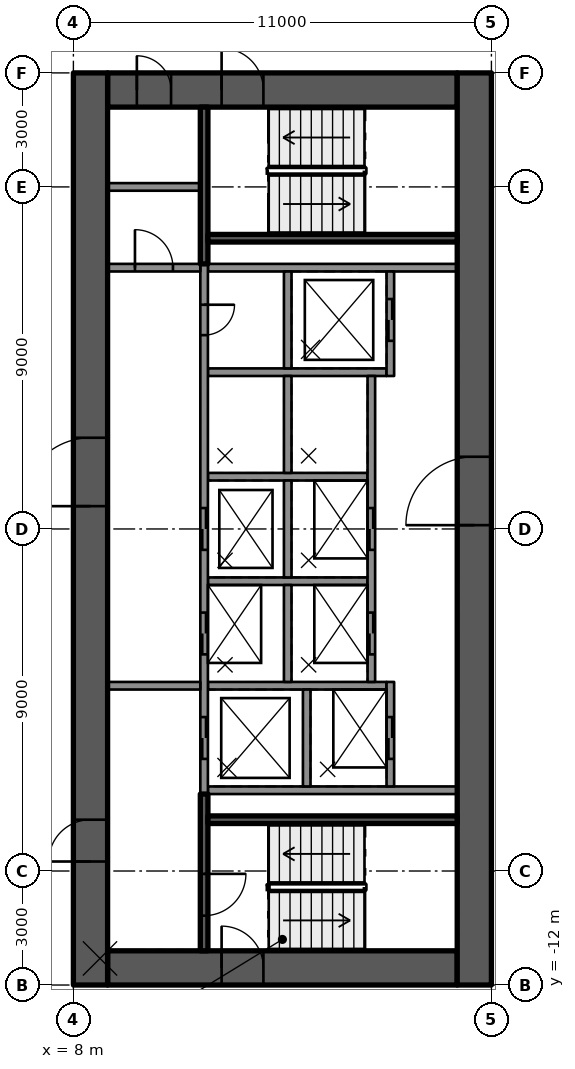
"""IFC4 building model, lengths in metres.
Left out: names, types, materials, properties, quantities, classifications, styles, units other than length and angle.
Written with IfcOpenShell. Run it as: python <this file> out.ifc"""

import sys

from ifc_helpers import new_model, si_unit, direction, frame, frame_2d, origin, place, context, subcontext, project, spatial, rectangle, extrude, element, fill, save


model = new_model("IFC4")
c1 = context("Model", 3, precision=1e-05, world=origin(), true_north=direction((0.0, 1.0)))
c2 = subcontext(c1, "Body", "Model", "MODEL_VIEW")
j1 = project(units=[si_unit("LENGTHUNIT", "METRE"), si_unit("PLANEANGLEUNIT", "RADIAN")], contexts=[c1])
p1 = place(None, origin())
s1 = spatial("IfcSite", under=j1, at=p1, CompositionType="ELEMENT")
p2 = place(p1, origin())
s2 = spatial("IfcBuilding", under=s1, at=p2, CompositionType="ELEMENT")
p3 = place(p2, frame((0.0, 0.0, 84.2)))
s3 = spatial("IfcBuildingStorey", under=s2, at=p3, CompositionType="ELEMENT", Elevation=84.2)
p4 = place(p3, frame((8.9, 11.55, 0.0), z_axis=(0.0, 0.0, 1.0), x_axis=(1.0, 0.0, 0.0)))
e1 = element("IfcWall", 1, at=p4, inside=s3, PredefinedType="SHEAR", context=c2, shape_type="SweptSolid", body=[
    extrude(rectangle(XDim=9.2, YDim=0.9, at=frame_2d((4.6, 0.0))), origin(), (0.0, 0.0, 1.0), 3.5),
])
p5 = place(p4, frame((3.0, 0.0, 0.0)))
e2 = element("IfcOpeningElement", 2, at=p5, cuts=e1, PredefinedType="OPENING", context=c2, shape_type="SweptSolid", body=[
    extrude(rectangle(XDim=1.1, YDim=2.1, at=frame_2d((0.55, 1.05))), frame((0.0, 0.46, 0.0), z_axis=(0.0, -1.0, 0.0), x_axis=(1.0, 0.0, 0.0)), (0.0, 0.0, 1.0), 0.92),
])
p6 = place(p4, frame((0.77, 0.0, 0.0)))
e3 = element("IfcOpeningElement", 3, at=p6, cuts=e1, PredefinedType="OPENING", context=c2, shape_type="SweptSolid", body=[
    extrude(rectangle(XDim=0.9, YDim=2.1, at=frame_2d((0.45, 1.05))), frame((0.0, 0.46, 0.0), z_axis=(0.0, -1.0, 0.0), x_axis=(1.0, 0.0, 0.0)), (0.0, 0.0, 1.0), 0.92),
])
p7 = place(p3, frame((8.9, -11.55, 0.0), z_axis=(0.0, 0.0, 1.0), x_axis=(1.0, 0.0, 0.0)))
e4 = element("IfcWall", 4, at=p7, inside=s3, PredefinedType="SHEAR", context=c2, shape_type="SweptSolid", body=[
    extrude(rectangle(XDim=9.2, YDim=0.9, at=frame_2d((4.6, 0.0))), origin(), (0.0, 0.0, 1.0), 3.5),
])
p8 = place(p7, frame((3.0, 0.0, 0.0)))
e5 = element("IfcOpeningElement", 5, at=p8, cuts=e4, PredefinedType="OPENING", context=c2, shape_type="SweptSolid", body=[
    extrude(rectangle(XDim=1.1, YDim=2.1, at=frame_2d((0.55, 1.05))), frame((0.0, 0.46, 0.0), z_axis=(0.0, -1.0, 0.0), x_axis=(1.0, 0.0, 0.0)), (0.0, 0.0, 1.0), 0.92),
])
p9 = place(p3, frame((8.45, -12.0, 0.0), z_axis=(0.0, 0.0, 1.0), x_axis=(0.0, 1.0, 0.0)))
e6 = element("IfcWall", 6, at=p9, inside=s3, PredefinedType="SHEAR", context=c2, shape_type="SweptSolid", body=[
    extrude(rectangle(XDim=24.0, YDim=0.9, at=frame_2d((12.0, 0.0))), origin(), (0.0, 0.0, 1.0), 3.5),
])
p10 = place(p9, frame((12.6, 0.0, 0.0)))
e7 = element("IfcOpeningElement", 7, at=p10, cuts=e6, PredefinedType="OPENING", context=c2, shape_type="SweptSolid", body=[
    extrude(rectangle(XDim=1.8, YDim=2.1, at=frame_2d((0.9, 1.05))), frame((0.0, 0.46, 0.0), z_axis=(0.0, -1.0, 0.0), x_axis=(1.0, 0.0, 0.0)), (0.0, 0.0, 1.0), 0.92),
])
p11 = place(p9, frame((3.25, 0.0, 0.0)))
e8 = element("IfcOpeningElement", 8, at=p11, cuts=e6, PredefinedType="OPENING", context=c2, shape_type="SweptSolid", body=[
    extrude(rectangle(XDim=1.1, YDim=2.1, at=frame_2d((0.55, 1.05))), frame((0.0, 0.46, 0.0), z_axis=(0.0, -1.0, 0.0), x_axis=(1.0, 0.0, 0.0)), (0.0, 0.0, 1.0), 0.92),
])
p12 = place(p3, frame((18.55, -12.0, 0.0), z_axis=(0.0, 0.0, 1.0), x_axis=(0.0, 1.0, 0.0)))
e9 = element("IfcWall", 9, at=p12, inside=s3, PredefinedType="SHEAR", context=c2, shape_type="SweptSolid", body=[
    extrude(rectangle(XDim=24.0, YDim=0.9, at=frame_2d((12.0, 0.0))), origin(), (0.0, 0.0, 1.0), 3.5),
])
p13 = place(p12, frame((12.1, 0.0, 0.0)))
e10 = element("IfcOpeningElement", 10, at=p13, cuts=e9, PredefinedType="OPENING", context=c2, shape_type="SweptSolid", body=[
    extrude(rectangle(XDim=1.8, YDim=2.1, at=frame_2d((0.9, 1.05))), frame((0.0, 0.46, 0.0), z_axis=(0.0, -1.0, 0.0), x_axis=(1.0, 0.0, 0.0)), (0.0, 0.0, 1.0), 0.92),
])
for number, where, z_axis, x_axis in (
    (11, (11.54, -6.875, 0.0), (0.0, 0.0, 1.0), (1.0, 0.0, 0.0)),
    (12, (11.54, 6.875, 0.0), (0.0, 0.0, 1.0), (1.0, 0.0, 0.0)),
):
    element("IfcWall", number, at=place(p3, frame(where, z_axis=z_axis, x_axis=x_axis)), inside=s3, PredefinedType="SOLIDWALL", context=c2, shape_type="SweptSolid", body=[
        extrude(rectangle(XDim=6.56, YDim=0.2, at=frame_2d((3.28, 0.0))), origin(), (0.0, 0.0, 1.0), 3.09),
    ])
p14 = place(p3, frame((11.54, 4.125, 0.0), z_axis=(0.0, 0.0, 1.0), x_axis=(1.0, 0.0, 0.0)))
e13 = element("IfcWall", 13, at=p14, inside=s3, PredefinedType="SOLIDWALL", context=c2, shape_type="SweptSolid", body=[
    extrude(rectangle(XDim=4.7, YDim=0.2, at=frame_2d((2.35, 0.0))), origin(), (0.0, 0.0, 1.0), 3.09),
])
for number, where, z_axis, x_axis in (
    (14, (11.54, 1.375, 0.0), (0.0, 0.0, 1.0), (1.0, 0.0, 0.0)),
    (15, (11.54, -1.375, 0.0), (0.0, 0.0, 1.0), (1.0, 0.0, 0.0)),
):
    element("IfcWall", number, at=place(p3, frame(where, z_axis=z_axis, x_axis=x_axis)), inside=s3, PredefinedType="SOLIDWALL", context=c2, shape_type="SweptSolid", body=[
        extrude(rectangle(XDim=4.2, YDim=0.2, at=frame_2d((2.1, 0.0))), origin(), (0.0, 0.0, 1.0), 3.09),
    ])
p15 = place(p3, frame((11.54, -4.125, 0.0), z_axis=(0.0, 0.0, 1.0), x_axis=(1.0, 0.0, 0.0)))
e16 = element("IfcWall", 16, at=p15, inside=s3, PredefinedType="SOLIDWALL", context=c2, shape_type="SweptSolid", body=[
    extrude(rectangle(XDim=4.7, YDim=0.2, at=frame_2d((2.35, 0.0))), origin(), (0.0, 0.0, 1.0), 3.09),
])
p16 = place(p3, frame((11.44, 6.975, 0.0), z_axis=(0.0, 0.0, 1.0), x_axis=(0.0, -1.0, 0.0)))
e17 = element("IfcWall", 17, at=p16, inside=s3, PredefinedType="SOLIDWALL", context=c2, shape_type="SweptSolid", body=[
    extrude(rectangle(XDim=13.95, YDim=0.2, at=frame_2d((6.975, 0.0))), origin(), (0.0, 0.0, 1.0), 3.09),
])
p17 = place(p16, frame((6.425, 0.0, 0.0)))
e18 = element("IfcOpeningElement", 18, at=p17, cuts=e17, PredefinedType="OPENING", context=c2, shape_type="SweptSolid", body=[
    extrude(rectangle(XDim=1.1, YDim=2.1, at=frame_2d((0.55, 1.05))), frame((0.0, 0.11, 0.0), z_axis=(0.0, -1.0, 0.0), x_axis=(1.0, 0.0, 0.0)), (0.0, 0.0, 1.0), 0.22),
])
p18 = place(p16, frame((9.175, 0.0, 0.0)))
e19 = element("IfcOpeningElement", 19, at=p18, cuts=e17, PredefinedType="OPENING", context=c2, shape_type="SweptSolid", body=[
    extrude(rectangle(XDim=1.1, YDim=2.1, at=frame_2d((0.55, 1.05))), frame((0.0, 0.11, 0.0), z_axis=(0.0, -1.0, 0.0), x_axis=(1.0, 0.0, 0.0)), (0.0, 0.0, 1.0), 0.22),
])
p19 = place(p16, frame((11.925, 0.0, 0.0)))
e20 = element("IfcOpeningElement", 20, at=p19, cuts=e17, PredefinedType="OPENING", context=c2, shape_type="SweptSolid", body=[
    extrude(rectangle(XDim=1.1, YDim=2.1, at=frame_2d((0.55, 1.05))), frame((0.0, 0.11, 0.0), z_axis=(0.0, -1.0, 0.0), x_axis=(1.0, 0.0, 0.0)), (0.0, 0.0, 1.0), 0.22),
])
p20 = place(p16, frame((1.075, 0.0, 0.0)))
e21 = element("IfcOpeningElement", 21, at=p20, cuts=e17, PredefinedType="OPENING", context=c2, shape_type="SweptSolid", body=[
    extrude(rectangle(XDim=0.8, YDim=2.1, at=frame_2d((0.4, 1.05))), frame((0.0, 0.11, 0.0), z_axis=(0.0, -1.0, 0.0), x_axis=(1.0, 0.0, 0.0)), (0.0, 0.0, 1.0), 0.22),
])
for number, where, z_axis, x_axis in (
    (22, (13.64, 6.775, 0.0), (0.0, 0.0, 1.0), (0.0, -1.0, 0.0)),
    (23, (13.64, 4.025, 0.0), (0.0, 0.0, 1.0), (0.0, -1.0, 0.0)),
    (24, (13.64, 1.275, 0.0), (0.0, 0.0, 1.0), (0.0, -1.0, 0.0)),
    (25, (13.64, -1.475, 0.0), (0.0, 0.0, 1.0), (0.0, -1.0, 0.0)),
    (26, (14.14, -4.225, 0.0), (0.0, 0.0, 1.0), (0.0, -1.0, 0.0)),
):
    element("IfcWall", number, at=place(p3, frame(where, z_axis=z_axis, x_axis=x_axis)), inside=s3, PredefinedType="SOLIDWALL", context=c2, shape_type="SweptSolid", body=[
        extrude(rectangle(XDim=2.55, YDim=0.2, at=frame_2d((1.275, 0.0))), origin(), (0.0, 0.0, 1.0), 3.09),
    ])
p21 = place(p3, frame((16.34, 6.775, 0.0), z_axis=(0.0, 0.0, 1.0), x_axis=(0.0, -1.0, 0.0)))
e27 = element("IfcWall", 27, at=p21, inside=s3, PredefinedType="SOLIDWALL", context=c2, shape_type="SweptSolid", body=[
    extrude(rectangle(XDim=2.75, YDim=0.2, at=frame_2d((1.375, 0.0))), origin(), (0.0, 0.0, 1.0), 3.09),
])
p22 = place(p21, frame((0.725, 0.0, 0.0)))
e28 = element("IfcOpeningElement", 28, at=p22, cuts=e27, PredefinedType="OPENING", context=c2, shape_type="SweptSolid", body=[
    extrude(rectangle(XDim=1.1, YDim=2.1, at=frame_2d((0.55, 1.05))), frame((0.0, 0.11, 0.0), z_axis=(0.0, -1.0, 0.0), x_axis=(1.0, 0.0, 0.0)), (0.0, 0.0, 1.0), 0.22),
])
p23 = place(p3, frame((15.84, 4.025, 0.0), z_axis=(0.0, 0.0, 1.0), x_axis=(0.0, -1.0, 0.0)))
e29 = element("IfcWall", 29, at=p23, inside=s3, PredefinedType="SOLIDWALL", context=c2, shape_type="SweptSolid", body=[
    extrude(rectangle(XDim=8.05, YDim=0.2, at=frame_2d((4.025, 0.0))), origin(), (0.0, 0.0, 1.0), 3.09),
])
p24 = place(p23, frame((3.475, 0.0, 0.0)))
e30 = element("IfcOpeningElement", 30, at=p24, cuts=e29, PredefinedType="OPENING", context=c2, shape_type="SweptSolid", body=[
    extrude(rectangle(XDim=1.1, YDim=2.1, at=frame_2d((0.55, 1.05))), frame((0.0, 0.11, 0.0), z_axis=(0.0, -1.0, 0.0), x_axis=(1.0, 0.0, 0.0)), (0.0, 0.0, 1.0), 0.22),
])
p25 = place(p23, frame((6.225, 0.0, 0.0)))
e31 = element("IfcOpeningElement", 31, at=p25, cuts=e29, PredefinedType="OPENING", context=c2, shape_type="SweptSolid", body=[
    extrude(rectangle(XDim=1.1, YDim=2.1, at=frame_2d((0.55, 1.05))), frame((0.0, 0.11, 0.0), z_axis=(0.0, -1.0, 0.0), x_axis=(1.0, 0.0, 0.0)), (0.0, 0.0, 1.0), 0.22),
])
p26 = place(p3, frame((16.34, -4.025, 0.0), z_axis=(0.0, 0.0, 1.0), x_axis=(0.0, -1.0, 0.0)))
e32 = element("IfcWall", 32, at=p26, inside=s3, PredefinedType="SOLIDWALL", context=c2, shape_type="SweptSolid", body=[
    extrude(rectangle(XDim=2.75, YDim=0.2, at=frame_2d((1.375, 0.0))), origin(), (0.0, 0.0, 1.0), 3.09),
])
p27 = place(p26, frame((0.925, 0.0, 0.0)))
e33 = element("IfcOpeningElement", 33, at=p27, cuts=e32, PredefinedType="OPENING", context=c2, shape_type="SweptSolid", body=[
    extrude(rectangle(XDim=1.1, YDim=2.1, at=frame_2d((0.55, 1.05))), frame((0.0, 0.11, 0.0), z_axis=(0.0, -1.0, 0.0), x_axis=(1.0, 0.0, 0.0)), (0.0, 0.0, 1.0), 0.22),
])
p28 = place(p3, frame((11.44, -6.975, 0.0), z_axis=(0.0, 0.0, 1.0), x_axis=(0.0, -1.0, 0.0)))
e34 = element("IfcWall", 34, at=p28, inside=s3, PredefinedType="SOLIDWALL", context=c2, shape_type="SweptSolid", body=[
    extrude(rectangle(XDim=4.125, YDim=0.2, at=frame_2d((2.062, 0.0))), origin(), (0.0, 0.0, 1.0), 3.09),
])
p29 = place(p28, frame((2.1, 0.0, 0.0)))
e35 = element("IfcOpeningElement", 35, at=p29, cuts=e34, PredefinedType="OPENING", context=c2, shape_type="SweptSolid", body=[
    extrude(rectangle(XDim=1.1, YDim=2.1, at=frame_2d((0.55, 1.05))), frame((0.0, 0.11, 0.0), z_axis=(0.0, -1.0, 0.0), x_axis=(1.0, 0.0, 0.0)), (0.0, 0.0, 1.0), 0.22),
])
p30 = place(p3, frame((11.54, -7.65, 0.0), z_axis=(0.0, 0.0, 1.0), x_axis=(1.0, 0.0, 0.0)))
e36 = element("IfcWall", 36, at=p30, inside=s3, PredefinedType="SOLIDWALL", context=c2, shape_type="SweptSolid", body=[
    extrude(rectangle(XDim=6.56, YDim=0.2, at=frame_2d((3.28, 0.0))), origin(), (0.0, 0.0, 1.0), 3.09),
])
p31 = place(p3, frame((11.44, 11.1, 0.0), z_axis=(0.0, 0.0, 1.0), x_axis=(0.0, -1.0, 0.0)))
e37 = element("IfcWall", 37, at=p31, inside=s3, PredefinedType="SOLIDWALL", context=c2, shape_type="SweptSolid", body=[
    extrude(rectangle(XDim=4.125, YDim=0.2, at=frame_2d((2.062, 0.0))), origin(), (0.0, 0.0, 1.0), 3.09),
])
p32 = place(p3, frame((11.54, 7.65, 0.0), z_axis=(0.0, 0.0, 1.0), x_axis=(1.0, 0.0, 0.0)))
e38 = element("IfcWall", 38, at=p32, inside=s3, PredefinedType="SOLIDWALL", context=c2, shape_type="SweptSolid", body=[
    extrude(rectangle(XDim=6.56, YDim=0.2, at=frame_2d((3.28, 0.0))), origin(), (0.0, 0.0, 1.0), 3.09),
])
p33 = place(p3, frame((8.9, -4.125, 0.0), z_axis=(0.0, 0.0, 1.0), x_axis=(1.0, 0.0, 0.0)))
e39 = element("IfcWall", 39, at=p33, inside=s3, PredefinedType="PARTITIONING", context=c2, shape_type="SweptSolid", body=[
    extrude(rectangle(XDim=2.44, YDim=0.2, at=frame_2d((1.22, 0.0))), origin(), (0.0, 0.0, 1.0), 3.09),
])
p34 = place(p3, frame((8.9, 6.875, 0.0), z_axis=(0.0, 0.0, 1.0), x_axis=(1.0, 0.0, 0.0)))
e40 = element("IfcWall", 40, at=p34, inside=s3, PredefinedType="PARTITIONING", context=c2, shape_type="SweptSolid", body=[
    extrude(rectangle(XDim=2.44, YDim=0.2, at=frame_2d((1.22, 0.0))), origin(), (0.0, 0.0, 1.0), 3.09),
])
p35 = place(p34, frame((0.72, 0.0, 0.0)))
e41 = element("IfcOpeningElement", 41, at=p35, cuts=e40, PredefinedType="OPENING", context=c2, shape_type="SweptSolid", body=[
    extrude(rectangle(XDim=1.0, YDim=2.1, at=frame_2d((0.5, 1.05))), frame((0.0, 0.11, 0.0), z_axis=(0.0, -1.0, 0.0), x_axis=(1.0, 0.0, 0.0)), (0.0, 0.0, 1.0), 0.22),
])
p36 = place(p3, frame((8.9, 9.0, 0.0), z_axis=(0.0, 0.0, 1.0), x_axis=(1.0, 0.0, 0.0)))
e42 = element("IfcWall", 42, at=p36, inside=s3, PredefinedType="PARTITIONING", context=c2, shape_type="SweptSolid", body=[
    extrude(rectangle(XDim=2.44, YDim=0.2, at=frame_2d((1.22, 0.0))), origin(), (0.0, 0.0, 1.0), 3.09),
])
p37 = place(p22, origin())
e43 = element("IfcDoor", 43, at=p37, inside=s3, OperationType="DOUBLE_DOOR_SLIDING", PredefinedType="DOOR", context=c2, shape_type="SweptSolid", body=[
    extrude(rectangle(XDim=1.1, YDim=2.1, at=frame_2d((0.55, 1.05))), frame((0.0, 0.025, 0.0), z_axis=(0.0, -1.0, 0.0), x_axis=(1.0, 0.0, 0.0)), (0.0, 0.0, 1.0), 0.05),
])
fill(e28, e43)
p38 = place(p17, origin())
e44 = element("IfcDoor", 44, at=p38, inside=s3, OperationType="DOUBLE_DOOR_SLIDING", PredefinedType="DOOR", context=c2, shape_type="SweptSolid", body=[
    extrude(rectangle(XDim=1.1, YDim=2.1, at=frame_2d((0.55, 1.05))), frame((0.0, 0.025, 0.0), z_axis=(0.0, -1.0, 0.0), x_axis=(1.0, 0.0, 0.0)), (0.0, 0.0, 1.0), 0.05),
])
fill(e18, e44)
p39 = place(p24, origin())
e45 = element("IfcDoor", 45, at=p39, inside=s3, OperationType="DOUBLE_DOOR_SLIDING", PredefinedType="DOOR", context=c2, shape_type="SweptSolid", body=[
    extrude(rectangle(XDim=1.1, YDim=2.1, at=frame_2d((0.55, 1.05))), frame((0.0, 0.025, 0.0), z_axis=(0.0, -1.0, 0.0), x_axis=(1.0, 0.0, 0.0)), (0.0, 0.0, 1.0), 0.05),
])
fill(e30, e45)
p40 = place(p18, origin())
e46 = element("IfcDoor", 46, at=p40, inside=s3, OperationType="DOUBLE_DOOR_SLIDING", PredefinedType="DOOR", context=c2, shape_type="SweptSolid", body=[
    extrude(rectangle(XDim=1.1, YDim=2.1, at=frame_2d((0.55, 1.05))), frame((0.0, 0.025, 0.0), z_axis=(0.0, -1.0, 0.0), x_axis=(1.0, 0.0, 0.0)), (0.0, 0.0, 1.0), 0.05),
])
fill(e19, e46)
p41 = place(p25, origin())
e47 = element("IfcDoor", 47, at=p41, inside=s3, OperationType="DOUBLE_DOOR_SLIDING", PredefinedType="DOOR", context=c2, shape_type="SweptSolid", body=[
    extrude(rectangle(XDim=1.1, YDim=2.1, at=frame_2d((0.55, 1.05))), frame((0.0, 0.025, 0.0), z_axis=(0.0, -1.0, 0.0), x_axis=(1.0, 0.0, 0.0)), (0.0, 0.0, 1.0), 0.05),
])
fill(e31, e47)
p42 = place(p19, origin())
e48 = element("IfcDoor", 48, at=p42, inside=s3, OperationType="DOUBLE_DOOR_SLIDING", PredefinedType="DOOR", context=c2, shape_type="SweptSolid", body=[
    extrude(rectangle(XDim=1.1, YDim=2.1, at=frame_2d((0.55, 1.05))), frame((0.0, 0.025, 0.0), z_axis=(0.0, -1.0, 0.0), x_axis=(1.0, 0.0, 0.0)), (0.0, 0.0, 1.0), 0.05),
])
fill(e20, e48)
p43 = place(p27, origin())
e49 = element("IfcDoor", 49, at=p43, inside=s3, OperationType="DOUBLE_DOOR_SLIDING", PredefinedType="DOOR", context=c2, shape_type="SweptSolid", body=[
    extrude(rectangle(XDim=1.1, YDim=2.1, at=frame_2d((0.55, 1.05))), frame((0.0, 0.025, 0.0), z_axis=(0.0, -1.0, 0.0), x_axis=(1.0, 0.0, 0.0)), (0.0, 0.0, 1.0), 0.05),
])
fill(e33, e49)
p44 = place(p20, origin())
e50 = element("IfcDoor", 50, at=p44, inside=s3, OperationType="SINGLE_SWING_LEFT", PredefinedType="DOOR", context=c2, shape_type="SweptSolid", body=[
    extrude(rectangle(XDim=0.8, YDim=2.1, at=frame_2d((0.4, 1.05))), frame((0.0, 0.025, 0.0), z_axis=(0.0, -1.0, 0.0), x_axis=(1.0, 0.0, 0.0)), (0.0, 0.0, 1.0), 0.05),
])
fill(e21, e50)
p45 = place(p10, origin())
e51 = element("IfcDoor", 51, at=p45, inside=s3, OperationType="SINGLE_SWING_RIGHT", PredefinedType="DOOR", context=c2, shape_type="SweptSolid", body=[
    extrude(rectangle(XDim=1.8, YDim=2.1, at=frame_2d((0.9, 1.05))), frame((0.0, 0.025, 0.0), z_axis=(0.0, -1.0, 0.0), x_axis=(1.0, 0.0, 0.0)), (0.0, 0.0, 1.0), 0.05),
])
fill(e7, e51)
p46 = place(p13, origin())
e52 = element("IfcDoor", 52, at=p46, inside=s3, OperationType="SINGLE_SWING_RIGHT", PredefinedType="DOOR", context=c2, shape_type="SweptSolid", body=[
    extrude(rectangle(XDim=1.8, YDim=2.1, at=frame_2d((0.9, 1.05))), frame((0.0, 0.025, 0.0), z_axis=(0.0, -1.0, 0.0), x_axis=(1.0, 0.0, 0.0)), (0.0, 0.0, 1.0), 0.05),
])
fill(e10, e52)
p47 = place(p11, origin())
e53 = element("IfcDoor", 53, at=p47, inside=s3, OperationType="SINGLE_SWING_LEFT", PredefinedType="DOOR", context=c2, shape_type="SweptSolid", body=[
    extrude(rectangle(XDim=1.1, YDim=2.1, at=frame_2d((0.55, 1.05))), frame((0.0, 0.025, 0.0), z_axis=(0.0, -1.0, 0.0), x_axis=(1.0, 0.0, 0.0)), (0.0, 0.0, 1.0), 0.05),
])
fill(e8, e53)
p48 = place(p8, origin())
e54 = element("IfcDoor", 54, at=p48, inside=s3, OperationType="SINGLE_SWING_LEFT", PredefinedType="DOOR", context=c2, shape_type="SweptSolid", body=[
    extrude(rectangle(XDim=1.1, YDim=2.1, at=frame_2d((0.55, 1.05))), frame((0.0, 0.025, 0.0), z_axis=(0.0, -1.0, 0.0), x_axis=(1.0, 0.0, 0.0)), (0.0, 0.0, 1.0), 0.05),
])
fill(e5, e54)
p49 = place(p5, origin())
e55 = element("IfcDoor", 55, at=p49, inside=s3, OperationType="SINGLE_SWING_LEFT", PredefinedType="DOOR", context=c2, shape_type="SweptSolid", body=[
    extrude(rectangle(XDim=1.1, YDim=2.1, at=frame_2d((0.55, 1.05))), frame((0.0, 0.025, 0.0), z_axis=(0.0, -1.0, 0.0), x_axis=(1.0, 0.0, 0.0)), (0.0, 0.0, 1.0), 0.05),
])
fill(e2, e55)
p50 = place(p29, origin())
e56 = element("IfcDoor", 56, at=p50, inside=s3, OperationType="SINGLE_SWING_RIGHT", PredefinedType="DOOR", context=c2, shape_type="SweptSolid", body=[
    extrude(rectangle(XDim=1.1, YDim=2.1, at=frame_2d((0.55, 1.05))), frame((0.0, 0.025, 0.0), z_axis=(0.0, -1.0, 0.0), x_axis=(1.0, 0.0, 0.0)), (0.0, 0.0, 1.0), 0.05),
])
fill(e35, e56)
p51 = place(p6, origin())
e57 = element("IfcDoor", 57, at=p51, inside=s3, OperationType="SINGLE_SWING_LEFT", PredefinedType="DOOR", context=c2, shape_type="SweptSolid", body=[
    extrude(rectangle(XDim=0.9, YDim=2.1, at=frame_2d((0.45, 1.05))), frame((0.0, 0.025, 0.0), z_axis=(0.0, -1.0, 0.0), x_axis=(1.0, 0.0, 0.0)), (0.0, 0.0, 1.0), 0.05),
])
fill(e3, e57)
p52 = place(p35, origin())
e58 = element("IfcDoor", 58, at=p52, inside=s3, OperationType="SINGLE_SWING_RIGHT", PredefinedType="DOOR", context=c2, shape_type="SweptSolid", body=[
    extrude(rectangle(XDim=1.0, YDim=2.1, at=frame_2d((0.5, 1.05))), frame((0.0, 0.025, 0.0), z_axis=(0.0, -1.0, 0.0), x_axis=(1.0, 0.0, 0.0)), (0.0, 0.0, 1.0), 0.05),
])
fill(e41, e58)
save(model, sys.argv[1])
